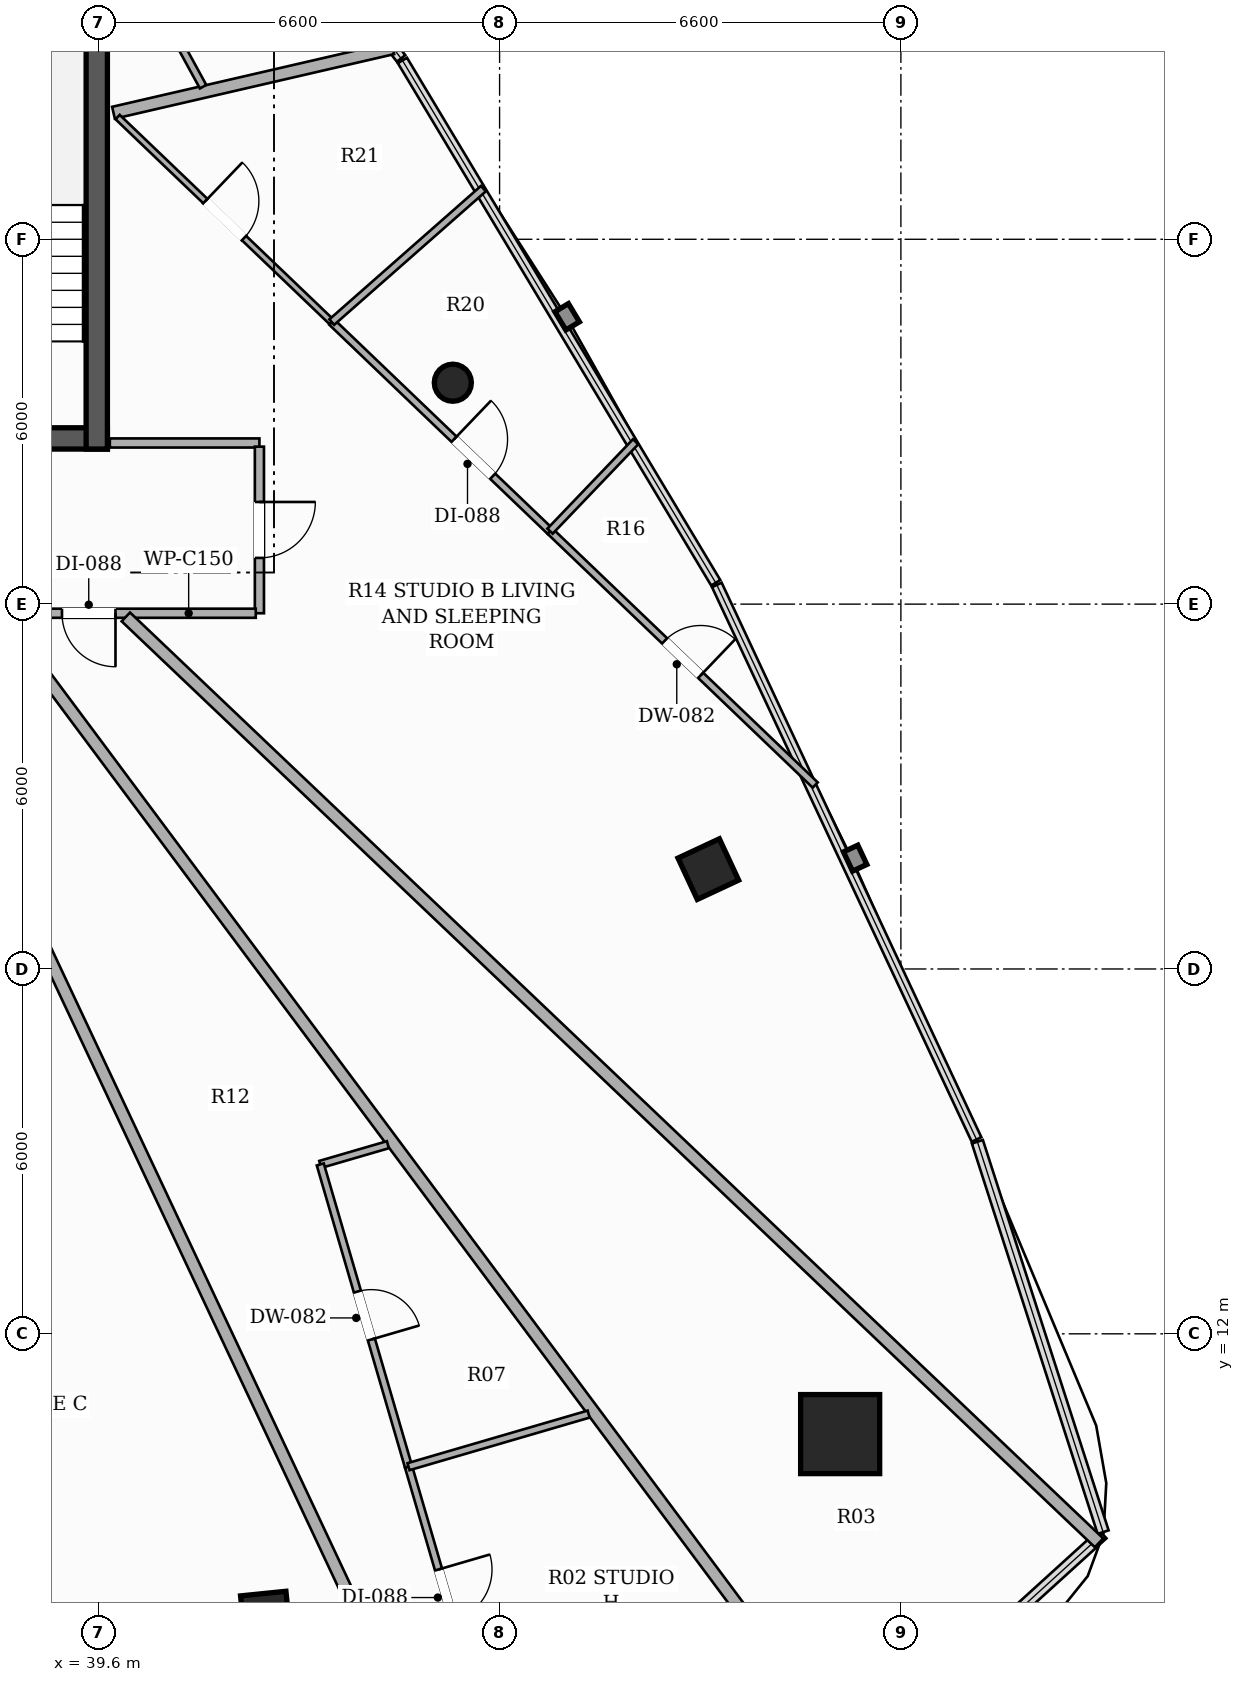
"""IFC4 building model, lengths in metres.
Left out: names, types, materials, properties, quantities, classifications, styles, units other than length and angle.
Written with IfcOpenShell. Run it as: python <this file> out.ifc"""

import sys

from ifc_helpers import new_model, si_unit, direction, frame, frame_2d, origin, origin_2d, place, context, subcontext, project, spatial, rectangle, hollow_rectangle, hollow_circle, extrude, element, fill, save


model = new_model("IFC4")
c1 = context("Model", 3, precision=1e-05, world=origin(), true_north=direction((0.0, 1.0)))
c2 = subcontext(c1, "Body", "Model", "MODEL_VIEW")
j1 = project(units=[si_unit("LENGTHUNIT", "METRE"), si_unit("PLANEANGLEUNIT", "RADIAN")], contexts=[c1])
p1 = place(None, origin())
s1 = spatial("IfcSite", under=j1, at=p1, CompositionType="ELEMENT")
p2 = place(p1, origin())
s2 = spatial("IfcBuilding", under=s1, at=p2, CompositionType="ELEMENT")
p3 = place(p2, frame((0.0, 0.0, 219.5)))
s3 = spatial("IfcBuildingStorey", under=s2, at=p3, CompositionType="ELEMENT", Elevation=219.5)
p4 = place(p3, frame((26.25, 26.725, 0.0), z_axis=(0.0, 0.0, 1.0), x_axis=(1.0, 0.0, 0.0)))
e1 = element("IfcWall", 1, at=p4, inside=s3, PredefinedType="SHEAR", context=c2, shape_type="SweptSolid", body=[
    extrude(rectangle(XDim=13.5, YDim=0.35, at=frame_2d((6.75, 0.0))), origin(), (0.0, 0.0, 1.0), 3.3),
])
p5 = place(p4, frame((4.35, 0.0, 0.0)))
e2 = element("IfcOpeningElement", 2, at=p5, cuts=e1, PredefinedType="OPENING", context=c2, shape_type="SweptSolid", body=[
    extrude(rectangle(XDim=1.05, YDim=2.15, at=frame_2d((0.525, 1.075))), frame((0.0, 0.185, 0.0), z_axis=(0.0, -1.0, 0.0), x_axis=(1.0, 0.0, 0.0)), (0.0, 0.0, 1.0), 0.37),
])
p6 = place(p4, frame((8.3, 0.0, 0.0)))
e3 = element("IfcOpeningElement", 3, at=p6, cuts=e1, PredefinedType="OPENING", context=c2, shape_type="SweptSolid", body=[
    extrude(rectangle(XDim=1.05, YDim=2.15, at=frame_2d((0.525, 1.075))), frame((0.0, 0.185, 0.0), z_axis=(0.0, -1.0, 0.0), x_axis=(1.0, 0.0, 0.0)), (0.0, 0.0, 1.0), 0.37),
])
p7 = place(p3, frame((39.575, 26.55, 0.0), z_axis=(0.0, 0.0, 1.0), x_axis=(0.0, 1.0, 0.0)))
e4 = element("IfcWall", 4, at=p7, inside=s3, PredefinedType="SHEAR", context=c2, shape_type="SweptSolid", body=[
    extrude(rectangle(XDim=7.5, YDim=0.35, at=frame_2d((3.75, 0.0))), origin(), (0.0, 0.0, 1.0), 3.3),
])
p8 = place(p3, frame((51.801, 10.351, 0.0), z_axis=(0.0, 0.0, 1.0), x_axis=(1.0, 0.0, 0.0)))
e5 = element("IfcColumn", 5, at=p8, inside=s3, PredefinedType="COLUMN", context=c2, shape_type="SweptSolid", body=[
    extrude(hollow_rectangle(XDim=1.3, YDim=1.3, WallThickness=0.04, at=origin_2d()), origin(), (0.0, 0.0, 1.0), 3.3),
])
for number, where, z_axis, x_axis in (
    (6, (42.351, 7.355, 0.0), (0.0, 0.0, 1.0), (0.995, 0.101, 0.0)),
    (7, (49.633, 19.642, 0.0), (0.0, 0.0, 1.0), (-0.423, 0.906, 0.0)),
):
    element("IfcColumn", number, at=place(p3, frame(where, z_axis=z_axis, x_axis=x_axis)), inside=s3, PredefinedType="COLUMN", context=c2, shape_type="SweptSolid", body=[
        extrude(hollow_rectangle(XDim=0.75, YDim=0.75, WallThickness=0.025, at=origin_2d()), origin(), (0.0, 0.0, 1.0), 3.3),
    ])
p9 = place(p3, frame((45.431, 27.641, 0.0), z_axis=(0.0, 0.0, 1.0), x_axis=(1.0, 0.0, 0.0)))
e8 = element("IfcColumn", 8, at=p9, inside=s3, PredefinedType="COLUMN", context=c2, shape_type="SweptSolid", body=[
    extrude(hollow_circle(Radius=0.305, WallThickness=0.016, at=origin_2d()), origin(), (0.0, 0.0, 1.0), 3.3),
])
p10 = place(p3, frame((39.79, 26.65, 0.0), z_axis=(0.0, 0.0, 1.0), x_axis=(1.0, 0.0, 0.0)))
e9 = element("IfcWall", 9, at=p10, inside=s3, PredefinedType="PARTITIONING", context=c2, shape_type="SweptSolid", body=[
    extrude(rectangle(XDim=2.46, YDim=0.15, at=frame_2d((1.23, 0.0))), origin(), (0.0, 0.0, 1.0), 2.565),
])
p11 = place(p3, frame((42.25, 26.59, 0.0), z_axis=(0.0, 0.0, 1.0), x_axis=(0.0, -1.0, 0.0)))
e10 = element("IfcWall", 10, at=p11, inside=s3, PredefinedType="PARTITIONING", context=c2, shape_type="SweptSolid", body=[
    extrude(rectangle(XDim=2.74, YDim=0.15, at=frame_2d((1.37, 0.0))), origin(), (0.0, 0.0, 1.0), 2.773),
])
p12 = place(p11, frame((0.91, 0.0, 0.0)))
e11 = element("IfcOpeningElement", 11, at=p12, cuts=e10, PredefinedType="OPENING", context=c2, shape_type="SweptSolid", body=[
    extrude(rectangle(XDim=0.92, YDim=2.15, at=frame_2d((0.46, 1.075))), frame((0.0, 0.085, 0.0), z_axis=(0.0, -1.0, 0.0), x_axis=(1.0, 0.0, 0.0)), (0.0, 0.0, 1.0), 0.17),
])
p13 = place(p3, frame((42.19, 23.85, 0.0), z_axis=(0.0, 0.0, 1.0), x_axis=(-1.0, 0.0, 0.0)))
e12 = element("IfcWall", 12, at=p13, inside=s3, PredefinedType="PARTITIONING", context=c2, shape_type="SweptSolid", body=[
    extrude(rectangle(XDim=8.263, YDim=0.15, at=frame_2d((4.131, 0.0))), origin(), (0.0, 0.0, 1.0), 2.565),
])
p14 = place(p13, frame((6.516, 0.0, 0.0)))
e13 = element("IfcOpeningElement", 13, at=p14, cuts=e12, PredefinedType="OPENING", context=c2, shape_type="SweptSolid", body=[
    extrude(rectangle(XDim=0.88, YDim=2.1, at=frame_2d((0.44, 1.05))), frame((0.0, 0.085, 0.0), z_axis=(0.0, -1.0, 0.0), x_axis=(1.0, 0.0, 0.0)), (0.0, 0.0, 1.0), 0.17),
])
p15 = place(p13, frame((2.307, 0.0, 0.0)))
e14 = element("IfcOpeningElement", 14, at=p15, cuts=e12, PredefinedType="OPENING", context=c2, shape_type="SweptSolid", body=[
    extrude(rectangle(XDim=0.88, YDim=2.1, at=frame_2d((0.44, 1.05))), frame((0.0, 0.085, 0.0), z_axis=(0.0, -1.0, 0.0), x_axis=(1.0, 0.0, 0.0)), (0.0, 0.0, 1.0), 0.17),
])
p16 = place(p13, frame((4.384, 0.0, 0.0)))
e15 = element("IfcOpeningElement", 15, at=p16, cuts=e12, PredefinedType="OPENING", context=c2, shape_type="SweptSolid", body=[
    extrude(rectangle(XDim=0.92, YDim=2.15, at=frame_2d((0.46, 1.075))), frame((0.0, 0.085, 0.0), z_axis=(0.0, -1.0, 0.0), x_axis=(1.0, 0.0, 0.0)), (0.0, 0.0, 1.0), 0.17),
])
p17 = place(p3, frame((39.85, 32.081, 0.0), z_axis=(0.0, 0.0, 1.0), x_axis=(0.974339670333, 0.225082666628, 0.0)))
e16 = element("IfcWall", 16, at=p17, inside=s3, PredefinedType="PARTITIONING", context=c2, shape_type="SweptSolid", body=[
    extrude(rectangle(XDim=4.714, YDim=0.2, at=frame_2d((2.357, 0.0))), origin(), (0.0, 0.0, 1.0), 2.492),
])
p18 = place(p3, frame((56.059, 8.563, 0.0), z_axis=(0.0, 0.0, 1.0), x_axis=(-0.724518891706, 0.689254942355, 0.0)))
e17 = element("IfcWall", 17, at=p18, inside=s3, PredefinedType="PARTITIONING", context=c2, shape_type="SweptSolid", body=[
    extrude(rectangle(XDim=22.092, YDim=0.2, at=frame_2d((11.046, 0.0))), origin(), (0.0, 0.0, 1.0), 2.492),
])
p19 = place(p3, frame((36.155, 23.79, 0.0), z_axis=(0.0, 0.0, 1.0), x_axis=(0.425451226132, -0.90498135571, 0.0)))
e18 = element("IfcWall", 18, at=p19, inside=s3, PredefinedType="PARTITIONING", context=c2, shape_type="SweptSolid", body=[
    extrude(rectangle(XDim=20.266, YDim=0.2, at=frame_2d((10.133, 0.0))), origin(), (0.0, 0.0, 1.0), 2.492),
])
p20 = place(p3, frame((51.072, 6.251, 0.0), z_axis=(0.0, 0.0, 1.0), x_axis=(-0.59756139073, 0.801823162742, 0.0)))
e19 = element("IfcWall", 19, at=p20, inside=s3, PredefinedType="PARTITIONING", context=c2, shape_type="SweptSolid", body=[
    extrude(rectangle(XDim=21.874, YDim=0.2, at=frame_2d((10.937, 0.0))), origin(), (0.0, 0.0, 1.0), 2.492),
])
p21 = place(p3, frame((47.03, 25.2, 0.0), z_axis=(0.0, 0.0, 1.0), x_axis=(0.722345830301, -0.691531995968, 0.0)))
e20 = element("IfcWall", 20, at=p21, inside=s3, PredefinedType="PARTITIONING", context=c2, shape_type="SweptSolid", body=[
    extrude(rectangle(XDim=6.037, YDim=0.12, at=frame_2d((3.019, 0.0))), origin(), (0.0, 0.0, 1.0), 2.492),
])
p22 = place(p21, frame((2.609, 0.0, 0.0)))
e21 = element("IfcOpeningElement", 21, at=p22, cuts=e20, PredefinedType="OPENING", context=c2, shape_type="SweptSolid", body=[
    extrude(rectangle(XDim=0.82, YDim=2.1, at=frame_2d((0.41, 1.05))), frame((0.0, 0.07, 0.0), z_axis=(0.0, -1.0, 0.0), x_axis=(1.0, 0.0, 0.0)), (0.0, 0.0, 1.0), 0.14),
])
p23 = place(p3, frame((43.44, 28.638, 0.0), z_axis=(0.0, 0.0, 1.0), x_axis=(0.722240667523, -0.691641827954, 0.0)))
e22 = element("IfcWall", 22, at=p23, inside=s3, PredefinedType="PARTITIONING", context=c2, shape_type="SweptSolid", body=[
    extrude(rectangle(XDim=4.971, YDim=0.12, at=frame_2d((2.485, 0.0))), origin(), (0.0, 0.0, 1.0), 2.492),
])
p24 = place(p23, frame((2.785, 0.0, 0.0)))
e23 = element("IfcOpeningElement", 23, at=p24, cuts=e22, PredefinedType="OPENING", context=c2, shape_type="SweptSolid", body=[
    extrude(rectangle(XDim=0.88, YDim=2.1, at=frame_2d((0.44, 1.05))), frame((0.0, 0.07, 0.0), z_axis=(0.0, -1.0, 0.0), x_axis=(1.0, 0.0, 0.0)), (0.0, 0.0, 1.0), 0.14),
])
p25 = place(p3, frame((39.918, 32.01, 0.0), z_axis=(0.0, 0.0, 1.0), x_axis=(0.722311203135, -0.691568164266, 0.0)))
e24 = element("IfcWall", 24, at=p25, inside=s3, PredefinedType="PARTITIONING", context=c2, shape_type="SweptSolid", body=[
    extrude(rectangle(XDim=4.876, YDim=0.1, at=frame_2d((2.438, 0.0))), origin(), (0.0, 0.0, 1.0), 2.773),
])
p26 = place(p25, frame((1.998, 0.0, 0.0)))
e25 = element("IfcOpeningElement", 25, at=p26, cuts=e24, PredefinedType="OPENING", context=c2, shape_type="SweptSolid", body=[
    extrude(rectangle(XDim=0.88, YDim=2.1, at=frame_2d((0.44, 1.05))), frame((0.0, 0.06, 0.0), z_axis=(0.0, -1.0, 0.0), x_axis=(1.0, 0.0, 0.0)), (0.0, 0.0, 1.0), 0.12),
])
p27 = place(p3, frame((47.03, 25.2, 0.0), z_axis=(0.0, 0.0, 1.0), x_axis=(0.691459612883, 0.722415118717, 0.0)))
e26 = element("IfcWall", 26, at=p27, inside=s3, PredefinedType="PARTITIONING", context=c2, shape_type="SweptSolid", body=[
    extrude(rectangle(XDim=2.035, YDim=0.12, at=frame_2d((1.018, 0.0))), origin(), (0.0, 0.0, 1.0), 2.492),
])
p28 = place(p3, frame((43.44, 28.638, 0.0), z_axis=(0.0, 0.0, 1.0), x_axis=(0.750679989093, 0.66066599275, 0.0)))
e27 = element("IfcWall", 27, at=p28, inside=s3, PredefinedType="PARTITIONING", context=c2, shape_type="SweptSolid", body=[
    extrude(rectangle(XDim=3.323, YDim=0.12, at=frame_2d((1.661, 0.0))), origin(), (0.0, 0.0, 1.0), 2.492),
])
p29 = place(p3, frame((38.357, 37.934, 0.0), z_axis=(0.0, 0.0, 1.0), x_axis=(0.479839410825, -0.877356335715, 0.0)))
e28 = element("IfcWall", 28, at=p29, inside=s3, PredefinedType="PARTITIONING", context=c2, shape_type="SweptSolid", body=[
    extrude(rectangle(XDim=6.183, YDim=0.12, at=frame_2d((3.092, 0.0))), origin(), (0.0, 0.0, 1.0), 2.492),
])
p30 = place(p3, frame((44.363, 15.11, 0.0), z_axis=(0.0, 0.0, 1.0), x_axis=(-0.960030681494, -0.279894784857, 0.0)))
e29 = element("IfcWall", 29, at=p30, inside=s3, PredefinedType="PARTITIONING", context=c2, shape_type="SweptSolid", body=[
    extrude(rectangle(XDim=1.158, YDim=0.12, at=frame_2d((0.579, 0.0))), origin(), (0.0, 0.0, 1.0), 2.773),
])
p31 = place(p3, frame((43.251, 14.786, 0.0), z_axis=(0.0, 0.0, 1.0), x_axis=(0.280190088139, -0.959944537204, 0.0)))
e30 = element("IfcWall", 30, at=p31, inside=s3, PredefinedType="PARTITIONING", context=c2, shape_type="SweptSolid", body=[
    extrude(rectangle(XDim=5.178, YDim=0.12, at=frame_2d((2.589, 0.0))), origin(), (0.0, 0.0, 1.0), 3.06),
])
p32 = place(p31, frame((2.179, 0.0, 0.0)))
e31 = element("IfcOpeningElement", 31, at=p32, cuts=e30, PredefinedType="OPENING", context=c2, shape_type="SweptSolid", body=[
    extrude(rectangle(XDim=0.82, YDim=2.1, at=frame_2d((0.41, 1.05))), frame((0.0, 0.07, 0.0), z_axis=(0.0, -1.0, 0.0), x_axis=(1.0, 0.0, 0.0)), (0.0, 0.0, 1.0), 0.14),
])
p33 = place(p3, frame((44.702, 9.815, 0.0), z_axis=(0.0, 0.0, 1.0), x_axis=(0.28033432121, -0.959902426474, 0.0)))
e32 = element("IfcWall", 32, at=p33, inside=s3, PredefinedType="PARTITIONING", context=c2, shape_type="SweptSolid", body=[
    extrude(rectangle(XDim=4.402, YDim=0.12, at=frame_2d((2.201, 0.0))), origin(), (0.0, 0.0, 1.0), 2.492),
])
p34 = place(p33, frame((1.761, 0.0, 0.0)))
e33 = element("IfcOpeningElement", 33, at=p34, cuts=e32, PredefinedType="OPENING", context=c2, shape_type="SweptSolid", body=[
    extrude(rectangle(XDim=0.88, YDim=2.1, at=frame_2d((0.44, 1.05))), frame((0.0, 0.07, 0.0), z_axis=(0.0, -1.0, 0.0), x_axis=(1.0, 0.0, 0.0)), (0.0, 0.0, 1.0), 0.14),
])
p35 = place(p3, frame((47.665, 10.68, 0.0), z_axis=(0.0, 0.0, 1.0), x_axis=(-0.959935309068, -0.280221702235, 0.0)))
e34 = element("IfcWall", 34, at=p35, inside=s3, PredefinedType="PARTITIONING", context=c2, shape_type="SweptSolid", body=[
    extrude(rectangle(XDim=3.087, YDim=0.12, at=frame_2d((1.543, 0.0))), origin(), (0.0, 0.0, 1.0), 2.773),
])
p36 = place(p12, origin())
e35 = element("IfcDoor", 35, at=p36, inside=s3, OperationType="SINGLE_SWING_LEFT", PredefinedType="DOOR", context=c2, shape_type="SweptSolid", body=[
    extrude(rectangle(XDim=0.92, YDim=2.15, at=frame_2d((0.46, 1.075))), frame((0.0, 0.025, 0.0), z_axis=(0.0, -1.0, 0.0), x_axis=(1.0, 0.0, 0.0)), (0.0, 0.0, 1.0), 0.05),
])
fill(e11, e35)
p37 = place(p22, origin())
e36 = element("IfcDoor", 36, at=p37, inside=s3, OperationType="SINGLE_SWING_RIGHT", PredefinedType="DOOR", context=c2, shape_type="SweptSolid", body=[
    extrude(rectangle(XDim=0.82, YDim=2.1, at=frame_2d((0.41, 1.05))), frame((0.0, 0.025, 0.0), z_axis=(0.0, -1.0, 0.0), x_axis=(1.0, 0.0, 0.0)), (0.0, 0.0, 1.0), 0.05),
])
fill(e21, e36)
p38 = place(p24, origin())
e37 = element("IfcDoor", 37, at=p38, inside=s3, OperationType="SINGLE_SWING_LEFT", PredefinedType="DOOR", context=c2, shape_type="SweptSolid", body=[
    extrude(rectangle(XDim=0.88, YDim=2.1, at=frame_2d((0.44, 1.05))), frame((0.0, 0.025, 0.0), z_axis=(0.0, -1.0, 0.0), x_axis=(1.0, 0.0, 0.0)), (0.0, 0.0, 1.0), 0.05),
])
fill(e23, e37)
p39 = place(p26, origin())
e38 = element("IfcDoor", 38, at=p39, inside=s3, OperationType="SINGLE_SWING_LEFT", PredefinedType="DOOR", context=c2, shape_type="SweptSolid", body=[
    extrude(rectangle(XDim=0.88, YDim=2.1, at=frame_2d((0.44, 1.05))), frame((0.0, 0.025, 0.0), z_axis=(0.0, -1.0, 0.0), x_axis=(1.0, 0.0, 0.0)), (0.0, 0.0, 1.0), 0.05),
])
fill(e25, e38)
p40 = place(p15, origin())
e39 = element("IfcDoor", 39, at=p40, inside=s3, OperationType="SINGLE_SWING_LEFT", PredefinedType="DOOR", context=c2, shape_type="SweptSolid", body=[
    extrude(rectangle(XDim=0.88, YDim=2.1, at=frame_2d((0.44, 1.05))), frame((0.0, 0.025, 0.0), z_axis=(0.0, -1.0, 0.0), x_axis=(1.0, 0.0, 0.0)), (0.0, 0.0, 1.0), 0.05),
])
fill(e14, e39)
p41 = place(p32, origin())
e40 = element("IfcDoor", 40, at=p41, inside=s3, OperationType="SINGLE_SWING_RIGHT", PredefinedType="DOOR", context=c2, shape_type="SweptSolid", body=[
    extrude(rectangle(XDim=0.82, YDim=2.1, at=frame_2d((0.41, 1.05))), frame((0.0, 0.025, 0.0), z_axis=(0.0, -1.0, 0.0), x_axis=(1.0, 0.0, 0.0)), (0.0, 0.0, 1.0), 0.05),
])
fill(e31, e40)
p42 = place(p34, origin())
e41 = element("IfcDoor", 41, at=p42, inside=s3, OperationType="SINGLE_SWING_LEFT", PredefinedType="DOOR", context=c2, shape_type="SweptSolid", body=[
    extrude(rectangle(XDim=0.88, YDim=2.1, at=frame_2d((0.44, 1.05))), frame((0.0, 0.025, 0.0), z_axis=(0.0, -1.0, 0.0), x_axis=(1.0, 0.0, 0.0)), (0.0, 0.0, 1.0), 0.05),
])
fill(e33, e41)
save(model, sys.argv[1])
